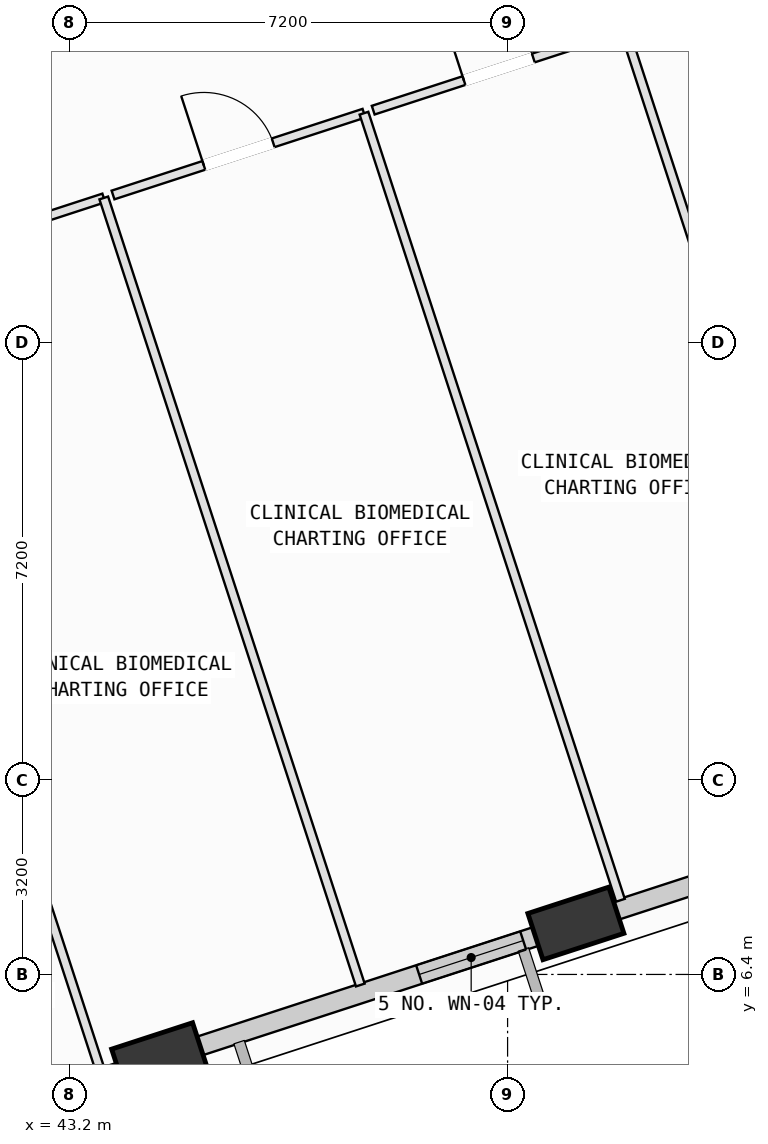
"""IFC4 building model, lengths in metres.
Left out: names, types, materials, properties, quantities, classifications, styles, units other than length and angle.
Written with IfcOpenShell. Run it as: python <this file> out.ifc"""

import sys

from ifc_helpers import new_model, si_unit, direction, frame, frame_2d, origin, origin_2d, place, context, subcontext, project, spatial, rectangle, extrude, element, fill, save


model = new_model("IFC4")
c1 = context("Model", 3, precision=1e-05, world=origin(), true_north=direction((0.0, 1.0)))
c2 = subcontext(c1, "Body", "Model", "MODEL_VIEW")
j1 = project(units=[si_unit("LENGTHUNIT", "METRE"), si_unit("PLANEANGLEUNIT", "RADIAN")], contexts=[c1])
p1 = place(None, origin())
s1 = spatial("IfcSite", under=j1, at=p1, CompositionType="ELEMENT")
p2 = place(p1, origin())
s2 = spatial("IfcBuilding", under=s1, at=p2, CompositionType="ELEMENT")
p3 = place(p2, frame((0.0, 0.0, 100.4)))
s3 = spatial("IfcBuildingStorey", under=s2, at=p3, CompositionType="ELEMENT", Elevation=100.4)
p4 = place(p3, frame((44.678, 5.008, 0.002), z_axis=(0.081259550756, 0.046407961996, 0.995611965815), x_axis=(-0.739401442167, 0.672640177904, 0.028994799376)))
e1 = element("IfcColumn", 1, at=p4, inside=s3, PredefinedType="COLUMN", context=c2, shape_type="SweptSolid", body=[
    extrude(rectangle(XDim=1.4, YDim=0.8, at=origin_2d()), origin(), (0.0, 0.0, 1.0), 4.014),
])
p5 = place(p3, frame((51.523, 7.239, 0.002), z_axis=(0.071761563641, 0.074495916193, 0.994635931612), x_axis=(-0.898565105275, 0.437668320266, 0.032049852079)))
e2 = element("IfcColumn", 2, at=p5, inside=s3, PredefinedType="COLUMN", context=c2, shape_type="SweptSolid", body=[
    extrude(rectangle(XDim=1.4, YDim=0.8, at=origin_2d()), origin(), (0.0, 0.0, 1.0), 4.018),
])
p6 = place(p3, frame((44.382, 4.912, 0.0), z_axis=(0.0, 0.0, 1.0), x_axis=(-0.950785253493, -0.309850611974, 0.0)))
e3 = element("IfcWall", 3, at=p6, inside=s3, PredefinedType="SOLIDWALL", context=c2, shape_type="SweptSolid", body=[
    extrude(rectangle(XDim=6.209, YDim=0.32, at=frame_2d((3.104, 0.0))), origin(), (0.0, 0.0, 1.0), 3.165),
])
p7 = place(p6, frame((2.144, 0.0, 0.75)))
e4 = element("IfcOpeningElement", 4, at=p7, cuts=e3, PredefinedType="OPENING", context=c2, shape_type="SweptSolid", body=[
    extrude(rectangle(XDim=1.4, YDim=1.85, at=frame_2d((0.7, 0.925))), frame((0.0, 0.17, 0.0), z_axis=(0.0, -1.0, 0.0), x_axis=(1.0, 0.0, 0.0)), (0.0, 0.0, 1.0), 0.34),
])
p8 = place(p3, frame((51.235, 7.146, 0.0), z_axis=(0.0, 0.0, 1.0), x_axis=(-0.950785923173, -0.309848557034, 0.0)))
e5 = element("IfcWall", 5, at=p8, inside=s3, PredefinedType="SOLIDWALL", context=c2, shape_type="SweptSolid", body=[
    extrude(rectangle(XDim=6.219, YDim=0.32, at=frame_2d((3.109, 0.0))), origin(), (0.0, 0.0, 1.0), 3.165),
])
p9 = place(p8, frame((0.608, 0.0, 0.75)))
e6 = element("IfcOpeningElement", 6, at=p9, cuts=e5, PredefinedType="OPENING", context=c2, shape_type="SweptSolid", body=[
    extrude(rectangle(XDim=1.8, YDim=2.05, at=frame_2d((0.9, 1.025))), frame((0.0, 0.17, 0.0), z_axis=(0.0, -1.0, 0.0), x_axis=(1.0, 0.0, 0.0)), (0.0, 0.0, 1.0), 0.34),
])
p10 = place(p3, frame((58.096, 9.381, 0.0), z_axis=(0.0, 0.0, 1.0), x_axis=(-0.950793220237, -0.309826164729, 0.0)))
e7 = element("IfcWall", 7, at=p10, inside=s3, PredefinedType="SOLIDWALL", context=c2, shape_type="SweptSolid", body=[
    extrude(rectangle(XDim=6.242, YDim=0.32, at=frame_2d((3.121, 0.0))), origin(), (0.0, 0.0, 1.0), 3.165),
])
p11 = place(p10, frame((3.66, 0.0, 0.75)))
e8 = element("IfcOpeningElement", 8, at=p11, cuts=e7, PredefinedType="OPENING", context=c2, shape_type="SweptSolid", body=[
    extrude(rectangle(XDim=1.2, YDim=1.75, at=frame_2d((0.6, 0.875))), frame((0.0, 0.17, 0.0), z_axis=(0.0, -1.0, 0.0), x_axis=(1.0, 0.0, 0.0)), (0.0, 0.0, 1.0), 0.34),
])
p12 = place(p3, frame((39.481, 17.776, 0.0), z_axis=(0.0, 0.0, 1.0), x_axis=(0.309813403984, -0.950797378368, 0.0)))
e9 = element("IfcWall", 9, at=p12, inside=s3, PredefinedType="PARTITIONING", context=c2, shape_type="SweptSolid", body=[
    extrude(rectangle(XDim=13.615, YDim=0.15, at=frame_2d((6.807, 0.0))), origin(), (0.0, 0.0, 1.0), 3.78),
])
p13 = place(p3, frame((39.633, 17.826, 0.0), z_axis=(0.0, 0.0, 1.0), x_axis=(0.950760835526, 0.309925529167, 0.0)))
e10 = element("IfcWall", 10, at=p13, inside=s3, PredefinedType="PARTITIONING", context=c2, shape_type="SweptSolid", body=[
    extrude(rectangle(XDim=4.34, YDim=0.15, at=frame_2d((2.17, 0.0))), origin(), (0.0, 0.0, 1.0), 2.965),
])
p14 = place(p13, frame((1.57, 0.0, 0.0)))
e11 = element("IfcOpeningElement", 11, at=p14, cuts=e10, PredefinedType="OPENING", context=c2, shape_type="SweptSolid", body=[
    extrude(rectangle(XDim=1.2, YDim=2.15, at=frame_2d((0.6, 1.075))), frame((0.0, 0.085, 0.0), z_axis=(0.0, -1.0, 0.0), x_axis=(1.0, 0.0, 0.0)), (0.0, 0.0, 1.0), 0.17),
])
p15 = place(p3, frame((43.759, 19.171, 0.0), z_axis=(0.0, 0.0, 1.0), x_axis=(0.309878245527, -0.950776247573, 0.0)))
e12 = element("IfcWall", 12, at=p15, inside=s3, PredefinedType="PARTITIONING", context=c2, shape_type="SweptSolid", body=[
    extrude(rectangle(XDim=13.615, YDim=0.15, at=frame_2d((6.808, 0.0))), origin(), (0.0, 0.0, 1.0), 3.78),
])
p16 = place(p3, frame((45.394, 5.0, 0.0), z_axis=(0.0, 0.0, 1.0), x_axis=(-0.951025003629, -0.309113963566, 0.0)))
e13 = element("IfcWall", 13, at=p16, inside=s3, PredefinedType="PARTITIONING", context=c2, shape_type="SweptSolid", body=[
    extrude(rectangle(XDim=0.99, YDim=0.15, at=frame_2d((0.495, 0.0))), origin(), (0.0, 0.0, 1.0), 3.165),
])
p17 = place(p3, frame((43.911, 19.22, 0.0), z_axis=(0.0, 0.0, 1.0), x_axis=(0.950787843692, 0.309842663762, 0.0)))
e14 = element("IfcWall", 14, at=p17, inside=s3, PredefinedType="PARTITIONING", context=c2, shape_type="SweptSolid", body=[
    extrude(rectangle(XDim=4.341, YDim=0.15, at=frame_2d((2.17, 0.0))), origin(), (0.0, 0.0, 1.0), 3.78),
])
p18 = place(p17, frame((1.57, 0.0, 0.0)))
e15 = element("IfcOpeningElement", 15, at=p18, cuts=e14, PredefinedType="OPENING", context=c2, shape_type="SweptSolid", body=[
    extrude(rectangle(XDim=1.2, YDim=2.15, at=frame_2d((0.6, 1.075))), frame((0.0, 0.085, 0.0), z_axis=(0.0, -1.0, 0.0), x_axis=(1.0, 0.0, 0.0)), (0.0, 0.0, 1.0), 0.17),
])
p19 = place(p3, frame((48.038, 20.565, 0.0), z_axis=(0.0, 0.0, 1.0), x_axis=(0.309813403984, -0.950797378368, 0.0)))
e16 = element("IfcWall", 16, at=p19, inside=s3, PredefinedType="PARTITIONING", context=c2, shape_type="SweptSolid", body=[
    extrude(rectangle(XDim=13.615, YDim=0.15, at=frame_2d((6.807, 0.0))), origin(), (0.0, 0.0, 1.0), 3.78),
])
p20 = place(p3, frame((52.232, 7.228, 0.0), z_axis=(0.0, 0.0, 1.0), x_axis=(-0.95091781001, -0.309443562877, 0.0)))
e17 = element("IfcWall", 17, at=p20, inside=s3, PredefinedType="PARTITIONING", context=c2, shape_type="SweptSolid", body=[
    extrude(rectangle(XDim=0.973, YDim=0.15, at=frame_2d((0.486, 0.0))), origin(), (0.0, 0.0, 1.0), 3.165),
])
p21 = place(p3, frame((48.19, 20.615, 0.0), z_axis=(0.0, 0.0, 1.0), x_axis=(0.950827127497, 0.309722090939, 0.0)))
e18 = element("IfcWall", 18, at=p21, inside=s3, PredefinedType="PARTITIONING", context=c2, shape_type="SweptSolid", body=[
    extrude(rectangle(XDim=4.339, YDim=0.15, at=frame_2d((2.17, 0.0))), origin(), (0.0, 0.0, 1.0), 3.78),
])
p22 = place(p21, frame((1.57, 0.0, 0.0)))
e19 = element("IfcOpeningElement", 19, at=p22, cuts=e18, PredefinedType="OPENING", context=c2, shape_type="SweptSolid", body=[
    extrude(rectangle(XDim=1.2, YDim=2.15, at=frame_2d((0.6, 1.075))), frame((0.0, 0.085, 0.0), z_axis=(0.0, -1.0, 0.0), x_axis=(1.0, 0.0, 0.0)), (0.0, 0.0, 1.0), 0.17),
])
p23 = place(p3, frame((52.316, 21.959, 0.0), z_axis=(0.0, 0.0, 1.0), x_axis=(0.309872962478, -0.950777969415, 0.0)))
e20 = element("IfcWall", 20, at=p23, inside=s3, PredefinedType="PARTITIONING", context=c2, shape_type="SweptSolid", body=[
    extrude(rectangle(XDim=13.615, YDim=0.15, at=frame_2d((6.808, 0.0))), origin(), (0.0, 0.0, 1.0), 3.78),
])
p24 = place(p3, frame((44.802, 22.466, 0.0), z_axis=(0.0, 0.0, 1.0), x_axis=(-0.950794053115, -0.309823608787, 0.0)))
e21 = element("IfcWall", 21, at=p24, inside=s3, PredefinedType="PARTITIONING", context=c2, shape_type="SweptSolid", body=[
    extrude(rectangle(XDim=5.942, YDim=0.15, at=frame_2d((2.971, 0.0))), origin(), (0.0, 0.0, 1.0), 2.945),
])
p25 = place(p24, frame((2.511, 0.0, 0.0)))
e22 = element("IfcOpeningElement", 22, at=p25, cuts=e21, PredefinedType="OPENING", context=c2, shape_type="SweptSolid", body=[
    extrude(rectangle(XDim=0.92, YDim=2.1, at=frame_2d((0.46, 1.05))), frame((0.0, 0.085, 0.0), z_axis=(0.0, -1.0, 0.0), x_axis=(1.0, 0.0, 0.0)), (0.0, 0.0, 1.0), 0.17),
])
p26 = place(p9, origin())
e23 = element("IfcWindow", 23, at=p26, inside=s3, PartitioningType="SINGLE_PANEL", PredefinedType="WINDOW", context=c2, shape_type="SweptSolid", body=[
    extrude(rectangle(XDim=1.8, YDim=2.05, at=frame_2d((0.9, 1.025))), frame((0.0, 0.03, 0.0), z_axis=(0.0, -1.0, 0.0), x_axis=(1.0, 0.0, 0.0)), (0.0, 0.0, 1.0), 0.06),
])
fill(e6, e23)
p27 = place(p18, origin())
e24 = element("IfcDoor", 24, at=p27, inside=s3, OperationType="SINGLE_SWING_LEFT", PredefinedType="DOOR", context=c2, shape_type="SweptSolid", body=[
    extrude(rectangle(XDim=1.2, YDim=2.15, at=frame_2d((0.6, 1.075))), frame((0.0, 0.025, 0.0), z_axis=(0.0, -1.0, 0.0), x_axis=(1.0, 0.0, 0.0)), (0.0, 0.0, 1.0), 0.05),
])
fill(e15, e24)
p28 = place(p22, origin())
e25 = element("IfcDoor", 25, at=p28, inside=s3, OperationType="SINGLE_SWING_LEFT", PredefinedType="DOOR", context=c2, shape_type="SweptSolid", body=[
    extrude(rectangle(XDim=1.2, YDim=2.15, at=frame_2d((0.6, 1.075))), frame((0.0, 0.025, 0.0), z_axis=(0.0, -1.0, 0.0), x_axis=(1.0, 0.0, 0.0)), (0.0, 0.0, 1.0), 0.05),
])
fill(e19, e25)
save(model, sys.argv[1])
